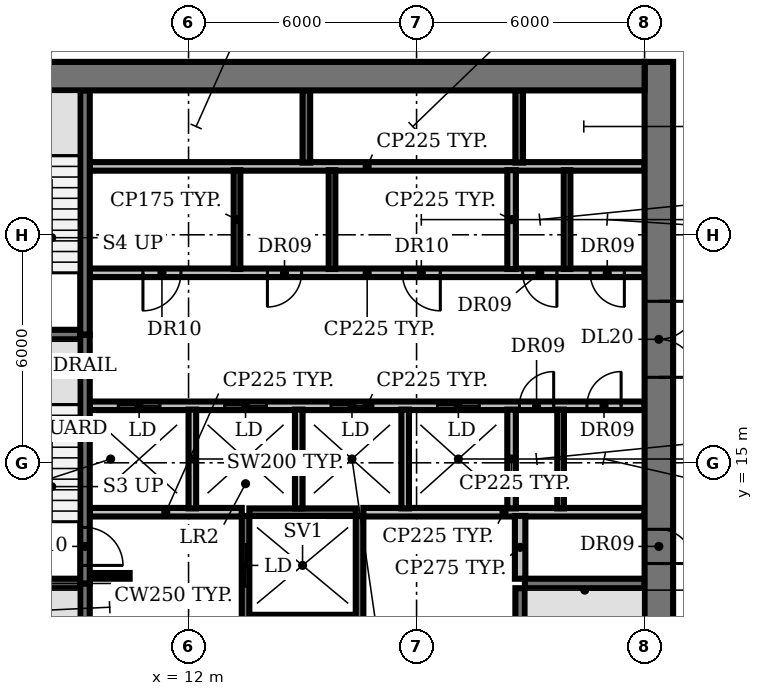
"""IFC4 building model, lengths in metres.
Left out: names, types, materials, properties, quantities, classifications, styles, units other than length and angle.
Written with IfcOpenShell. Run it as: python <this file> out.ifc"""

import sys

from ifc_helpers import new_model, si_unit, direction, frame, frame_2d, origin, place, context, subcontext, project, spatial, rectangle, extrude, element, fill, save


model = new_model("IFC4")
c1 = context("Model", 3, precision=1e-05, world=origin(), true_north=direction((0.0, 1.0)))
c2 = subcontext(c1, "Body", "Model", "MODEL_VIEW")
j1 = project(units=[si_unit("LENGTHUNIT", "METRE"), si_unit("PLANEANGLEUNIT", "RADIAN")], contexts=[c1])
p1 = place(None, origin())
s1 = spatial("IfcSite", under=j1, at=p1, CompositionType="ELEMENT")
p2 = place(p1, origin())
s2 = spatial("IfcBuilding", under=s1, at=p2, CompositionType="ELEMENT")
p3 = place(p2, frame((0.0, 0.0, 117.2)))
s3 = spatial("IfcBuildingStorey", under=s2, at=p3, CompositionType="ELEMENT", Elevation=117.2)
p4 = place(p3, frame((13.6, 10.9, 0.0), z_axis=(0.0, 0.0, 1.0), x_axis=(1.0, 0.0, 0.0)))
e1 = element("IfcWall", 1, at=p4, inside=s3, PredefinedType="SHEAR", context=c2, shape_type="SweptSolid", body=[
    extrude(rectangle(XDim=2.8, YDim=0.2, at=frame_2d((1.4, 0.0))), origin(), (0.0, 0.0, 1.0), 3.85),
])
for number, where, z_axis, x_axis in (
    (2, (6.0, 11.825, 0.0), (0.0, 0.0, 1.0), (1.0, 0.0, 0.0)),
    (3, (20.85, 11.825, 0.0), (0.0, 0.0, 1.0), (1.0, 0.0, 0.0)),
):
    element("IfcWall", number, at=place(p3, frame(where, z_axis=z_axis, x_axis=x_axis)), inside=s3, PredefinedType="SHEAR", context=c2, shape_type="SweptSolid", body=[
        extrude(rectangle(XDim=3.15, YDim=0.25, at=frame_2d((1.575, 0.0))), origin(), (0.0, 0.0, 1.0), 3.85),
    ])
p5 = place(p3, frame((9.4, 12.025, 0.0), z_axis=(0.0, 0.0, 1.0), x_axis=(1.0, 0.0, 0.0)))
e4 = element("IfcWall", 4, at=p5, inside=s3, PredefinedType="SHEAR", context=c2, shape_type="SweptSolid", body=[
    extrude(rectangle(XDim=1.05, YDim=0.15, at=frame_2d((0.525, 0.0))), origin(), (0.0, 0.0, 1.0), 3.85),
])
p6 = place(p3, frame((9.4, 13.7, 0.0), z_axis=(0.0, 0.0, 1.0), x_axis=(1.0, 0.0, 0.0)))
e5 = element("IfcWall", 5, at=p6, inside=s3, PredefinedType="PARTITIONING", context=c2, shape_type="SweptSolid", body=[
    extrude(rectangle(XDim=4.0, YDim=0.225, at=frame_2d((2.0, 0.0))), origin(), (0.0, 0.0, 1.0), 3.85),
])
p7 = place(p3, frame((13.6, 13.7, 0.0), z_axis=(0.0, 0.0, 1.0), x_axis=(1.0, 0.0, 0.0)))
e6 = element("IfcWall", 6, at=p7, inside=s3, PredefinedType="SHEAR", context=c2, shape_type="SweptSolid", body=[
    extrude(rectangle(XDim=2.8, YDim=0.2, at=frame_2d((1.4, 0.0))), origin(), (0.0, 0.0, 1.0), 3.85),
])
p8 = place(p3, frame((16.6, 13.7, 0.0), z_axis=(0.0, 0.0, 1.0), x_axis=(1.0, 0.0, 0.0)))
e7 = element("IfcWall", 7, at=p8, inside=s3, PredefinedType="PARTITIONING", context=c2, shape_type="SweptSolid", body=[
    extrude(rectangle(XDim=7.4, YDim=0.225, at=frame_2d((3.7, 0.0))), origin(), (0.0, 0.0, 1.0), 3.85),
])
p9 = place(p3, frame((9.4, 16.5, 0.0), z_axis=(0.0, 0.0, 1.0), x_axis=(1.0, 0.0, 0.0)))
e8 = element("IfcWall", 8, at=p9, inside=s3, PredefinedType="PARTITIONING", context=c2, shape_type="SweptSolid", body=[
    extrude(rectangle(XDim=14.6, YDim=0.225, at=frame_2d((7.3, 0.0))), origin(), (0.0, 0.0, 1.0), 3.85),
])
p10 = place(p9, frame((0.75, 0.0, 0.0)))
e9 = element("IfcOpeningElement", 9, at=p10, cuts=e8, PredefinedType="OPENING", context=c2, shape_type="SweptSolid", body=[
    extrude(rectangle(XDim=1.1, YDim=2.1, at=frame_2d((0.55, 1.05))), frame((0.0, 0.123, 0.0), z_axis=(0.0, -1.0, 0.0), x_axis=(1.0, 0.0, 0.0)), (0.0, 0.0, 1.0), 0.245),
])
p11 = place(p9, frame((3.55, 0.0, 0.0)))
e10 = element("IfcOpeningElement", 10, at=p11, cuts=e8, PredefinedType="OPENING", context=c2, shape_type="SweptSolid", body=[
    extrude(rectangle(XDim=1.1, YDim=2.1, at=frame_2d((0.55, 1.05))), frame((0.0, 0.123, 0.0), z_axis=(0.0, -1.0, 0.0), x_axis=(1.0, 0.0, 0.0)), (0.0, 0.0, 1.0), 0.245),
])
p12 = place(p9, frame((6.35, 0.0, 0.0)))
e11 = element("IfcOpeningElement", 11, at=p12, cuts=e8, PredefinedType="OPENING", context=c2, shape_type="SweptSolid", body=[
    extrude(rectangle(XDim=1.1, YDim=2.1, at=frame_2d((0.55, 1.05))), frame((0.0, 0.123, 0.0), z_axis=(0.0, -1.0, 0.0), x_axis=(1.0, 0.0, 0.0)), (0.0, 0.0, 1.0), 0.245),
])
p13 = place(p9, frame((9.15, 0.0, 0.0)))
e12 = element("IfcOpeningElement", 12, at=p13, cuts=e8, PredefinedType="OPENING", context=c2, shape_type="SweptSolid", body=[
    extrude(rectangle(XDim=1.1, YDim=2.1, at=frame_2d((0.55, 1.05))), frame((0.0, 0.123, 0.0), z_axis=(0.0, -1.0, 0.0), x_axis=(1.0, 0.0, 0.0)), (0.0, 0.0, 1.0), 0.245),
])
p14 = place(p9, frame((11.308, 0.0, 0.0)))
e13 = element("IfcOpeningElement", 13, at=p14, cuts=e8, PredefinedType="OPENING", context=c2, shape_type="SweptSolid", body=[
    extrude(rectangle(XDim=0.9, YDim=2.1, at=frame_2d((0.45, 1.05))), frame((0.0, 0.123, 0.0), z_axis=(0.0, -1.0, 0.0), x_axis=(1.0, 0.0, 0.0)), (0.0, 0.0, 1.0), 0.245),
])
p15 = place(p9, frame((13.083, 0.0, 0.0)))
e14 = element("IfcOpeningElement", 14, at=p15, cuts=e8, PredefinedType="OPENING", context=c2, shape_type="SweptSolid", body=[
    extrude(rectangle(XDim=0.9, YDim=2.1, at=frame_2d((0.45, 1.05))), frame((0.0, 0.123, 0.0), z_axis=(0.0, -1.0, 0.0), x_axis=(1.0, 0.0, 0.0)), (0.0, 0.0, 1.0), 0.245),
])
p16 = place(p3, frame((6.0, 18.375, 0.0), z_axis=(0.0, 0.0, 1.0), x_axis=(1.0, 0.0, 0.0)))
e15 = element("IfcWall", 15, at=p16, inside=s3, PredefinedType="SHEAR", context=c2, shape_type="SweptSolid", body=[
    extrude(rectangle(XDim=3.15, YDim=0.25, at=frame_2d((1.575, 0.0))), origin(), (0.0, 0.0, 1.0), 3.85),
])
p17 = place(p3, frame((24.0, 20.0, 0.0), z_axis=(0.0, 0.0, 1.0), x_axis=(-1.0, 0.0, 0.0)))
e16 = element("IfcWall", 16, at=p17, inside=s3, PredefinedType="PARTITIONING", context=c2, shape_type="SweptSolid", body=[
    extrude(rectangle(XDim=14.6, YDim=0.225, at=frame_2d((7.3, 0.0))), origin(), (0.0, 0.0, 1.0), 3.85),
])
p18 = place(p17, frame((12.2, 0.0, 0.0)))
e17 = element("IfcOpeningElement", 17, at=p18, cuts=e16, PredefinedType="OPENING", context=c2, shape_type="SweptSolid", body=[
    extrude(rectangle(XDim=1.0, YDim=2.1, at=frame_2d((0.5, 1.05))), frame((0.0, 0.123, 0.0), z_axis=(0.0, -1.0, 0.0), x_axis=(1.0, 0.0, 0.0)), (0.0, 0.0, 1.0), 0.245),
])
p19 = place(p17, frame((9.025, 0.0, 0.0)))
e18 = element("IfcOpeningElement", 18, at=p19, cuts=e16, PredefinedType="OPENING", context=c2, shape_type="SweptSolid", body=[
    extrude(rectangle(XDim=0.9, YDim=2.1, at=frame_2d((0.45, 1.05))), frame((0.0, 0.123, 0.0), z_axis=(0.0, -1.0, 0.0), x_axis=(1.0, 0.0, 0.0)), (0.0, 0.0, 1.0), 0.245),
])
p20 = place(p17, frame((5.375, 0.0, 0.0)))
e19 = element("IfcOpeningElement", 19, at=p20, cuts=e16, PredefinedType="OPENING", context=c2, shape_type="SweptSolid", body=[
    extrude(rectangle(XDim=1.0, YDim=2.1, at=frame_2d((0.5, 1.05))), frame((0.0, 0.123, 0.0), z_axis=(0.0, -1.0, 0.0), x_axis=(1.0, 0.0, 0.0)), (0.0, 0.0, 1.0), 0.245),
])
p21 = place(p17, frame((2.308, 0.0, 0.0)))
e20 = element("IfcOpeningElement", 20, at=p21, cuts=e16, PredefinedType="OPENING", context=c2, shape_type="SweptSolid", body=[
    extrude(rectangle(XDim=0.9, YDim=2.1, at=frame_2d((0.45, 1.05))), frame((0.0, 0.123, 0.0), z_axis=(0.0, -1.0, 0.0), x_axis=(1.0, 0.0, 0.0)), (0.0, 0.0, 1.0), 0.245),
])
p22 = place(p17, frame((0.532, 0.0, 0.0)))
e21 = element("IfcOpeningElement", 21, at=p22, cuts=e16, PredefinedType="OPENING", context=c2, shape_type="SweptSolid", body=[
    extrude(rectangle(XDim=0.9, YDim=2.1, at=frame_2d((0.45, 1.05))), frame((0.0, 0.123, 0.0), z_axis=(0.0, -1.0, 0.0), x_axis=(1.0, 0.0, 0.0)), (0.0, 0.0, 1.0), 0.245),
])
p23 = place(p3, frame((9.4, 22.8, 0.0), z_axis=(0.0, 0.0, 1.0), x_axis=(1.0, 0.0, 0.0)))
e22 = element("IfcWall", 22, at=p23, inside=s3, PredefinedType="PARTITIONING", context=c2, shape_type="SweptSolid", body=[
    extrude(rectangle(XDim=14.6, YDim=0.225, at=frame_2d((7.3, 0.0))), origin(), (0.0, 0.0, 1.0), 3.85),
])
p24 = place(p3, frame((9.275, 11.825, 0.0), z_axis=(0.0, 0.0, 1.0), x_axis=(0.0, -1.0, 0.0)))
e23 = element("IfcWall", 23, at=p24, inside=s3, PredefinedType="SHEAR", context=c2, shape_type="SweptSolid", body=[
    extrude(rectangle(XDim=6.425, YDim=0.25, at=frame_2d((3.212, 0.0))), origin(), (0.0, 0.0, 1.0), 3.85),
])
p25 = place(p24, frame((5.075, 0.0, 0.0)))
e24 = element("IfcOpeningElement", 24, at=p25, cuts=e23, PredefinedType="OPENING", context=c2, shape_type="SweptSolid", body=[
    extrude(rectangle(XDim=1.0, YDim=2.1, at=frame_2d((0.5, 1.05))), frame((0.0, 0.135, 0.0), z_axis=(0.0, -1.0, 0.0), x_axis=(1.0, 0.0, 0.0)), (0.0, 0.0, 1.0), 0.27),
])
p26 = place(p3, frame((9.275, 18.375, 0.0), z_axis=(0.0, 0.0, 1.0), x_axis=(0.0, -1.0, 0.0)))
e25 = element("IfcWall", 25, at=p26, inside=s3, PredefinedType="SHEAR", context=c2, shape_type="SweptSolid", body=[
    extrude(rectangle(XDim=6.55, YDim=0.25, at=frame_2d((3.275, 0.0))), origin(), (0.0, 0.0, 1.0), 3.85),
])
p27 = place(p26, frame((5.075, 0.0, 0.0)))
e26 = element("IfcOpeningElement", 26, at=p27, cuts=e25, PredefinedType="OPENING", context=c2, shape_type="SweptSolid", body=[
    extrude(rectangle(XDim=1.0, YDim=2.1, at=frame_2d((0.5, 1.05))), frame((0.0, 0.135, 0.0), z_axis=(0.0, -1.0, 0.0), x_axis=(1.0, 0.0, 0.0)), (0.0, 0.0, 1.0), 0.27),
])
p28 = place(p3, frame((9.275, 18.375, 0.0), z_axis=(0.0, 0.0, 1.0), x_axis=(0.0, 1.0, 0.0)))
e27 = element("IfcWall", 27, at=p28, inside=s3, PredefinedType="SHEAR", context=c2, shape_type="SweptSolid", body=[
    extrude(rectangle(XDim=6.425, YDim=0.25, at=frame_2d((3.212, 0.0))), origin(), (0.0, 0.0, 1.0), 3.85),
])
p29 = place(p3, frame((12.1, 13.8, 0.0), z_axis=(0.0, 0.0, 1.0), x_axis=(0.0, 1.0, 0.0)))
e28 = element("IfcWall", 28, at=p29, inside=s3, PredefinedType="SOLIDWALL", context=c2, shape_type="SweptSolid", body=[
    extrude(rectangle(XDim=2.6, YDim=0.2, at=frame_2d((1.3, 0.0))), origin(), (0.0, 0.0, 1.0), 3.85),
])
p30 = place(p3, frame((13.275, 20.1, 0.0), z_axis=(0.0, 0.0, 1.0), x_axis=(0.0, 1.0, 0.0)))
e29 = element("IfcWall", 29, at=p30, inside=s3, PredefinedType="PARTITIONING", context=c2, shape_type="SweptSolid", body=[
    extrude(rectangle(XDim=2.6, YDim=0.175, at=frame_2d((1.3, 0.0))), origin(), (0.0, 0.0, 1.0), 3.85),
])
p31 = place(p3, frame((13.5, 5.4, 0.0), z_axis=(0.0, 0.0, 1.0), x_axis=(0.0, 1.0, 0.0)))
e30 = element("IfcWall", 30, at=p31, inside=s3, PredefinedType="SHEAR", context=c2, shape_type="SweptSolid", body=[
    extrude(rectangle(XDim=8.2, YDim=0.2, at=frame_2d((4.1, 0.0))), origin(), (0.0, 0.0, 1.0), 3.85),
])
p32 = place(p31, frame((0.75, 0.0, 0.0)))
e31 = element("IfcOpeningElement", 31, at=p32, cuts=e30, PredefinedType="OPENING", context=c2, shape_type="SweptSolid", body=[
    extrude(rectangle(XDim=1.1, YDim=2.1, at=frame_2d((0.55, 1.05))), frame((0.0, 0.11, 0.0), z_axis=(0.0, -1.0, 0.0), x_axis=(1.0, 0.0, 0.0)), (0.0, 0.0, 1.0), 0.22),
])
p33 = place(p31, frame((3.55, 0.0, 0.0)))
e32 = element("IfcOpeningElement", 32, at=p33, cuts=e30, PredefinedType="OPENING", context=c2, shape_type="SweptSolid", body=[
    extrude(rectangle(XDim=1.1, YDim=2.1, at=frame_2d((0.55, 1.05))), frame((0.0, 0.11, 0.0), z_axis=(0.0, -1.0, 0.0), x_axis=(1.0, 0.0, 0.0)), (0.0, 0.0, 1.0), 0.22),
])
p34 = place(p31, frame((6.35, 0.0, 0.0)))
e33 = element("IfcOpeningElement", 33, at=p34, cuts=e30, PredefinedType="OPENING", context=c2, shape_type="SweptSolid", body=[
    extrude(rectangle(XDim=1.1, YDim=2.1, at=frame_2d((0.55, 1.05))), frame((0.0, 0.11, 0.0), z_axis=(0.0, -1.0, 0.0), x_axis=(1.0, 0.0, 0.0)), (0.0, 0.0, 1.0), 0.22),
])
p35 = place(p3, frame((14.9, 13.8, 0.0), z_axis=(0.0, 0.0, 1.0), x_axis=(0.0, 1.0, 0.0)))
e34 = element("IfcWall", 34, at=p35, inside=s3, PredefinedType="SOLIDWALL", context=c2, shape_type="SweptSolid", body=[
    extrude(rectangle(XDim=2.6, YDim=0.2, at=frame_2d((1.3, 0.0))), origin(), (0.0, 0.0, 1.0), 3.85),
])
p36 = place(p3, frame((15.1, 22.9, 0.0), z_axis=(0.0, 0.0, 1.0), x_axis=(0.0, 1.0, 0.0)))
e35 = element("IfcWall", 35, at=p36, inside=s3, PredefinedType="SHEAR", context=c2, shape_type="SweptSolid", body=[
    extrude(rectangle(XDim=1.9, YDim=0.2, at=frame_2d((0.95, 0.0))), origin(), (0.0, 0.0, 1.0), 3.85),
])
p37 = place(p3, frame((15.775, 20.1, 0.0), z_axis=(0.0, 0.0, 1.0), x_axis=(0.0, 1.0, 0.0)))
e36 = element("IfcWall", 36, at=p37, inside=s3, PredefinedType="PARTITIONING", context=c2, shape_type="SweptSolid", body=[
    extrude(rectangle(XDim=2.6, YDim=0.175, at=frame_2d((1.3, 0.0))), origin(), (0.0, 0.0, 1.0), 3.85),
])
p38 = place(p3, frame((16.5, 5.4, 0.0), z_axis=(0.0, 0.0, 1.0), x_axis=(0.0, 1.0, 0.0)))
e37 = element("IfcWall", 37, at=p38, inside=s3, PredefinedType="SHEAR", context=c2, shape_type="SweptSolid", body=[
    extrude(rectangle(XDim=8.2, YDim=0.2, at=frame_2d((4.1, 0.0))), origin(), (0.0, 0.0, 1.0), 3.85),
])
p39 = place(p3, frame((17.7, 13.8, 0.0), z_axis=(0.0, 0.0, 1.0), x_axis=(0.0, 1.0, 0.0)))
e38 = element("IfcWall", 38, at=p39, inside=s3, PredefinedType="SOLIDWALL", context=c2, shape_type="SweptSolid", body=[
    extrude(rectangle(XDim=2.6, YDim=0.2, at=frame_2d((1.3, 0.0))), origin(), (0.0, 0.0, 1.0), 3.85),
])
for number, where, z_axis, x_axis in (
    (39, (20.5, 13.8, 0.0), (0.0, 0.0, 1.0), (0.0, 1.0, 0.0)),
    (40, (20.5, 20.1, 0.0), (0.0, 0.0, 1.0), (0.0, 1.0, 0.0)),
):
    element("IfcWall", number, at=place(p3, frame(where, z_axis=z_axis, x_axis=x_axis)), inside=s3, PredefinedType="PARTITIONING", context=c2, shape_type="SweptSolid", body=[
        extrude(rectangle(XDim=2.6, YDim=0.225, at=frame_2d((1.3, 0.0))), origin(), (0.0, 0.0, 1.0), 3.85),
    ])
p40 = place(p3, frame((20.7, 22.9, 0.0), z_axis=(0.0, 0.0, 1.0), x_axis=(0.0, 1.0, 0.0)))
e41 = element("IfcWall", 41, at=p40, inside=s3, PredefinedType="SHEAR", context=c2, shape_type="SweptSolid", body=[
    extrude(rectangle(XDim=1.9, YDim=0.2, at=frame_2d((0.95, 0.0))), origin(), (0.0, 0.0, 1.0), 3.85),
])
p41 = place(p3, frame((20.725, 5.4, 0.0), z_axis=(0.0, 0.0, 1.0), x_axis=(0.0, 1.0, 0.0)))
e42 = element("IfcWall", 42, at=p41, inside=s3, PredefinedType="SHEAR", context=c2, shape_type="SweptSolid", body=[
    extrude(rectangle(XDim=6.3, YDim=0.25, at=frame_2d((3.15, 0.0))), origin(), (0.0, 0.0, 1.0), 3.85),
])
p42 = place(p3, frame((20.725, 11.95, 0.0), z_axis=(0.0, 0.0, 1.0), x_axis=(0.0, 1.0, 0.0)))
e43 = element("IfcWall", 43, at=p42, inside=s3, PredefinedType="PARTITIONING", context=c2, shape_type="SweptSolid", body=[
    extrude(rectangle(XDim=1.65, YDim=0.275, at=frame_2d((0.825, 0.0))), origin(), (0.0, 0.0, 1.0), 3.85),
])
for number, where, z_axis, x_axis in (
    (44, (21.79, 13.8, 0.0), (0.0, 0.0, 1.0), (0.0, 1.0, 0.0)),
    (45, (21.96, 20.1, 0.0), (0.0, 0.0, 1.0), (0.0, 1.0, 0.0)),
):
    element("IfcWall", number, at=place(p3, frame(where, z_axis=z_axis, x_axis=x_axis)), inside=s3, PredefinedType="PARTITIONING", context=c2, shape_type="SweptSolid", body=[
        extrude(rectangle(XDim=2.6, YDim=0.175, at=frame_2d((1.3, 0.0))), origin(), (0.0, 0.0, 1.0), 3.85),
    ])
p43 = place(p3, frame((24.375, 25.55, 0.0), z_axis=(0.0, 0.0, 1.0), x_axis=(0.0, -1.0, 0.0)))
e46 = element("IfcWall", 46, at=p43, inside=s3, PredefinedType="SHEAR", context=c2, shape_type="SweptSolid", body=[
    extrude(rectangle(XDim=21.13, YDim=0.75, at=frame_2d((10.565, 0.0))), origin(), (0.0, 0.0, 1.0), 3.85),
])
p44 = place(p43, frame((18.4, 0.0, 0.0)))
e47 = element("IfcOpeningElement", 47, at=p44, cuts=e46, PredefinedType="OPENING", context=c2, shape_type="SweptSolid", body=[
    extrude(rectangle(XDim=1.5, YDim=2.1, at=frame_2d((0.75, 1.05))), frame((0.0, 0.385, 0.0), z_axis=(0.0, -1.0, 0.0), x_axis=(1.0, 0.0, 0.0)), (0.0, 0.0, 1.0), 0.77),
])
p45 = place(p43, frame((12.3, 0.0, 0.0)))
e48 = element("IfcOpeningElement", 48, at=p45, cuts=e46, PredefinedType="OPENING", context=c2, shape_type="SweptSolid", body=[
    extrude(rectangle(XDim=0.9, YDim=2.1, at=frame_2d((0.45, 1.05))), frame((0.0, 0.385, 0.0), z_axis=(0.0, -1.0, 0.0), x_axis=(1.0, 0.0, 0.0)), (0.0, 0.0, 1.0), 0.77),
])
p46 = place(p43, frame((6.3, 0.0, 0.0)))
e49 = element("IfcOpeningElement", 49, at=p46, cuts=e46, PredefinedType="OPENING", context=c2, shape_type="SweptSolid", body=[
    extrude(rectangle(XDim=2.0, YDim=2.1, at=frame_2d((1.0, 1.05))), frame((0.0, 0.385, 0.0), z_axis=(0.0, -1.0, 0.0), x_axis=(1.0, 0.0, 0.0)), (0.0, 0.0, 1.0), 0.77),
])
p47 = place(p3, frame((6.0, 25.175, 0.0), z_axis=(0.0, 0.0, 1.0), x_axis=(1.0, 0.0, 0.0)))
e50 = element("IfcWall", 50, at=p47, inside=s3, PredefinedType="SHEAR", context=c2, shape_type="SweptSolid", body=[
    extrude(rectangle(XDim=18.0, YDim=0.75, at=frame_2d((9.0, 0.0))), origin(), (0.0, 0.0, 1.0), 3.85),
])
p48 = place(p10, origin())
e51 = element("IfcDoor", 51, at=p48, inside=s3, OperationType="DOUBLE_DOOR_SLIDING", PredefinedType="DOOR", context=c2, shape_type="SweptSolid", body=[
    extrude(rectangle(XDim=1.1, YDim=2.1, at=frame_2d((0.55, 1.05))), frame((0.0, 0.025, 0.0), z_axis=(0.0, -1.0, 0.0), x_axis=(1.0, 0.0, 0.0)), (0.0, 0.0, 1.0), 0.05),
])
fill(e9, e51)
p49 = place(p11, origin())
e52 = element("IfcDoor", 52, at=p49, inside=s3, OperationType="DOUBLE_DOOR_SLIDING", PredefinedType="DOOR", context=c2, shape_type="SweptSolid", body=[
    extrude(rectangle(XDim=1.1, YDim=2.1, at=frame_2d((0.55, 1.05))), frame((0.0, 0.025, 0.0), z_axis=(0.0, -1.0, 0.0), x_axis=(1.0, 0.0, 0.0)), (0.0, 0.0, 1.0), 0.05),
])
fill(e10, e52)
p50 = place(p12, origin())
e53 = element("IfcDoor", 53, at=p50, inside=s3, OperationType="DOUBLE_DOOR_SLIDING", PredefinedType="DOOR", context=c2, shape_type="SweptSolid", body=[
    extrude(rectangle(XDim=1.1, YDim=2.1, at=frame_2d((0.55, 1.05))), frame((0.0, 0.025, 0.0), z_axis=(0.0, -1.0, 0.0), x_axis=(1.0, 0.0, 0.0)), (0.0, 0.0, 1.0), 0.05),
])
fill(e11, e53)
p51 = place(p13, origin())
e54 = element("IfcDoor", 54, at=p51, inside=s3, OperationType="DOUBLE_DOOR_SLIDING", PredefinedType="DOOR", context=c2, shape_type="SweptSolid", body=[
    extrude(rectangle(XDim=1.1, YDim=2.1, at=frame_2d((0.55, 1.05))), frame((0.0, 0.025, 0.0), z_axis=(0.0, -1.0, 0.0), x_axis=(1.0, 0.0, 0.0)), (0.0, 0.0, 1.0), 0.05),
])
fill(e12, e54)
p52 = place(p14, origin())
e55 = element("IfcDoor", 55, at=p52, inside=s3, OperationType="SINGLE_SWING_RIGHT", PredefinedType="DOOR", context=c2, shape_type="SweptSolid", body=[
    extrude(rectangle(XDim=0.9, YDim=2.1, at=frame_2d((0.45, 1.05))), frame((0.0, 0.025, 0.0), z_axis=(0.0, -1.0, 0.0), x_axis=(1.0, 0.0, 0.0)), (0.0, 0.0, 1.0), 0.05),
])
fill(e13, e55)
p53 = place(p15, origin())
e56 = element("IfcDoor", 56, at=p53, inside=s3, OperationType="SINGLE_SWING_RIGHT", PredefinedType="DOOR", context=c2, shape_type="SweptSolid", body=[
    extrude(rectangle(XDim=0.9, YDim=2.1, at=frame_2d((0.45, 1.05))), frame((0.0, 0.025, 0.0), z_axis=(0.0, -1.0, 0.0), x_axis=(1.0, 0.0, 0.0)), (0.0, 0.0, 1.0), 0.05),
])
fill(e14, e56)
p54 = place(p18, origin())
e57 = element("IfcDoor", 57, at=p54, inside=s3, OperationType="SINGLE_SWING_RIGHT", PredefinedType="DOOR", context=c2, shape_type="SweptSolid", body=[
    extrude(rectangle(XDim=1.0, YDim=2.1, at=frame_2d((0.5, 1.05))), frame((0.0, 0.025, 0.0), z_axis=(0.0, -1.0, 0.0), x_axis=(1.0, 0.0, 0.0)), (0.0, 0.0, 1.0), 0.05),
])
fill(e17, e57)
p55 = place(p19, origin())
e58 = element("IfcDoor", 58, at=p55, inside=s3, OperationType="SINGLE_SWING_RIGHT", PredefinedType="DOOR", context=c2, shape_type="SweptSolid", body=[
    extrude(rectangle(XDim=0.9, YDim=2.1, at=frame_2d((0.45, 1.05))), frame((0.0, 0.025, 0.0), z_axis=(0.0, -1.0, 0.0), x_axis=(1.0, 0.0, 0.0)), (0.0, 0.0, 1.0), 0.05),
])
fill(e18, e58)
p56 = place(p20, origin())
e59 = element("IfcDoor", 59, at=p56, inside=s3, OperationType="SINGLE_SWING_LEFT", PredefinedType="DOOR", context=c2, shape_type="SweptSolid", body=[
    extrude(rectangle(XDim=1.0, YDim=2.1, at=frame_2d((0.5, 1.05))), frame((0.0, 0.025, 0.0), z_axis=(0.0, -1.0, 0.0), x_axis=(1.0, 0.0, 0.0)), (0.0, 0.0, 1.0), 0.05),
])
fill(e19, e59)
p57 = place(p21, origin())
e60 = element("IfcDoor", 60, at=p57, inside=s3, OperationType="SINGLE_SWING_LEFT", PredefinedType="DOOR", context=c2, shape_type="SweptSolid", body=[
    extrude(rectangle(XDim=0.9, YDim=2.1, at=frame_2d((0.45, 1.05))), frame((0.0, 0.025, 0.0), z_axis=(0.0, -1.0, 0.0), x_axis=(1.0, 0.0, 0.0)), (0.0, 0.0, 1.0), 0.05),
])
fill(e20, e60)
p58 = place(p22, origin())
e61 = element("IfcDoor", 61, at=p58, inside=s3, OperationType="SINGLE_SWING_LEFT", PredefinedType="DOOR", context=c2, shape_type="SweptSolid", body=[
    extrude(rectangle(XDim=0.9, YDim=2.1, at=frame_2d((0.45, 1.05))), frame((0.0, 0.025, 0.0), z_axis=(0.0, -1.0, 0.0), x_axis=(1.0, 0.0, 0.0)), (0.0, 0.0, 1.0), 0.05),
])
fill(e21, e61)
p59 = place(p27, origin())
e62 = element("IfcDoor", 62, at=p59, inside=s3, OperationType="SINGLE_SWING_RIGHT", PredefinedType="DOOR", context=c2, shape_type="SweptSolid", body=[
    extrude(rectangle(XDim=1.0, YDim=2.1, at=frame_2d((0.5, 1.05))), frame((0.0, 0.025, 0.0), z_axis=(0.0, -1.0, 0.0), x_axis=(1.0, 0.0, 0.0)), (0.0, 0.0, 1.0), 0.05),
])
fill(e26, e62)
p60 = place(p34, origin())
e63 = element("IfcDoor", 63, at=p60, inside=s3, OperationType="DOUBLE_DOOR_SLIDING", PredefinedType="DOOR", context=c2, shape_type="SweptSolid", body=[
    extrude(rectangle(XDim=1.1, YDim=2.1, at=frame_2d((0.55, 1.05))), frame((0.0, 0.025, 0.0), z_axis=(0.0, -1.0, 0.0), x_axis=(1.0, 0.0, 0.0)), (0.0, 0.0, 1.0), 0.05),
])
fill(e33, e63)
p61 = place(p45, origin())
e64 = element("IfcDoor", 64, at=p61, inside=s3, OperationType="SINGLE_SWING_RIGHT", PredefinedType="DOOR", context=c2, shape_type="SweptSolid", body=[
    extrude(rectangle(XDim=0.9, YDim=2.1, at=frame_2d((0.45, 1.05))), frame((0.0, -0.315, 0.0), z_axis=(0.0, -1.0, 0.0), x_axis=(1.0, 0.0, 0.0)), (0.0, 0.0, 1.0), 0.05),
])
fill(e48, e64)
p62 = place(p46, origin())
e65 = element("IfcDoor", 65, at=p62, inside=s3, OperationType="DOUBLE_DOOR_SINGLE_SWING", PredefinedType="DOOR", context=c2, shape_type="SweptSolid", body=[
    extrude(rectangle(XDim=2.0, YDim=2.1, at=frame_2d((1.0, 1.05))), frame((0.0, 0.025, 0.0), z_axis=(0.0, -1.0, 0.0), x_axis=(1.0, 0.0, 0.0)), (0.0, 0.0, 1.0), 0.05),
])
fill(e49, e65)
save(model, sys.argv[1])
